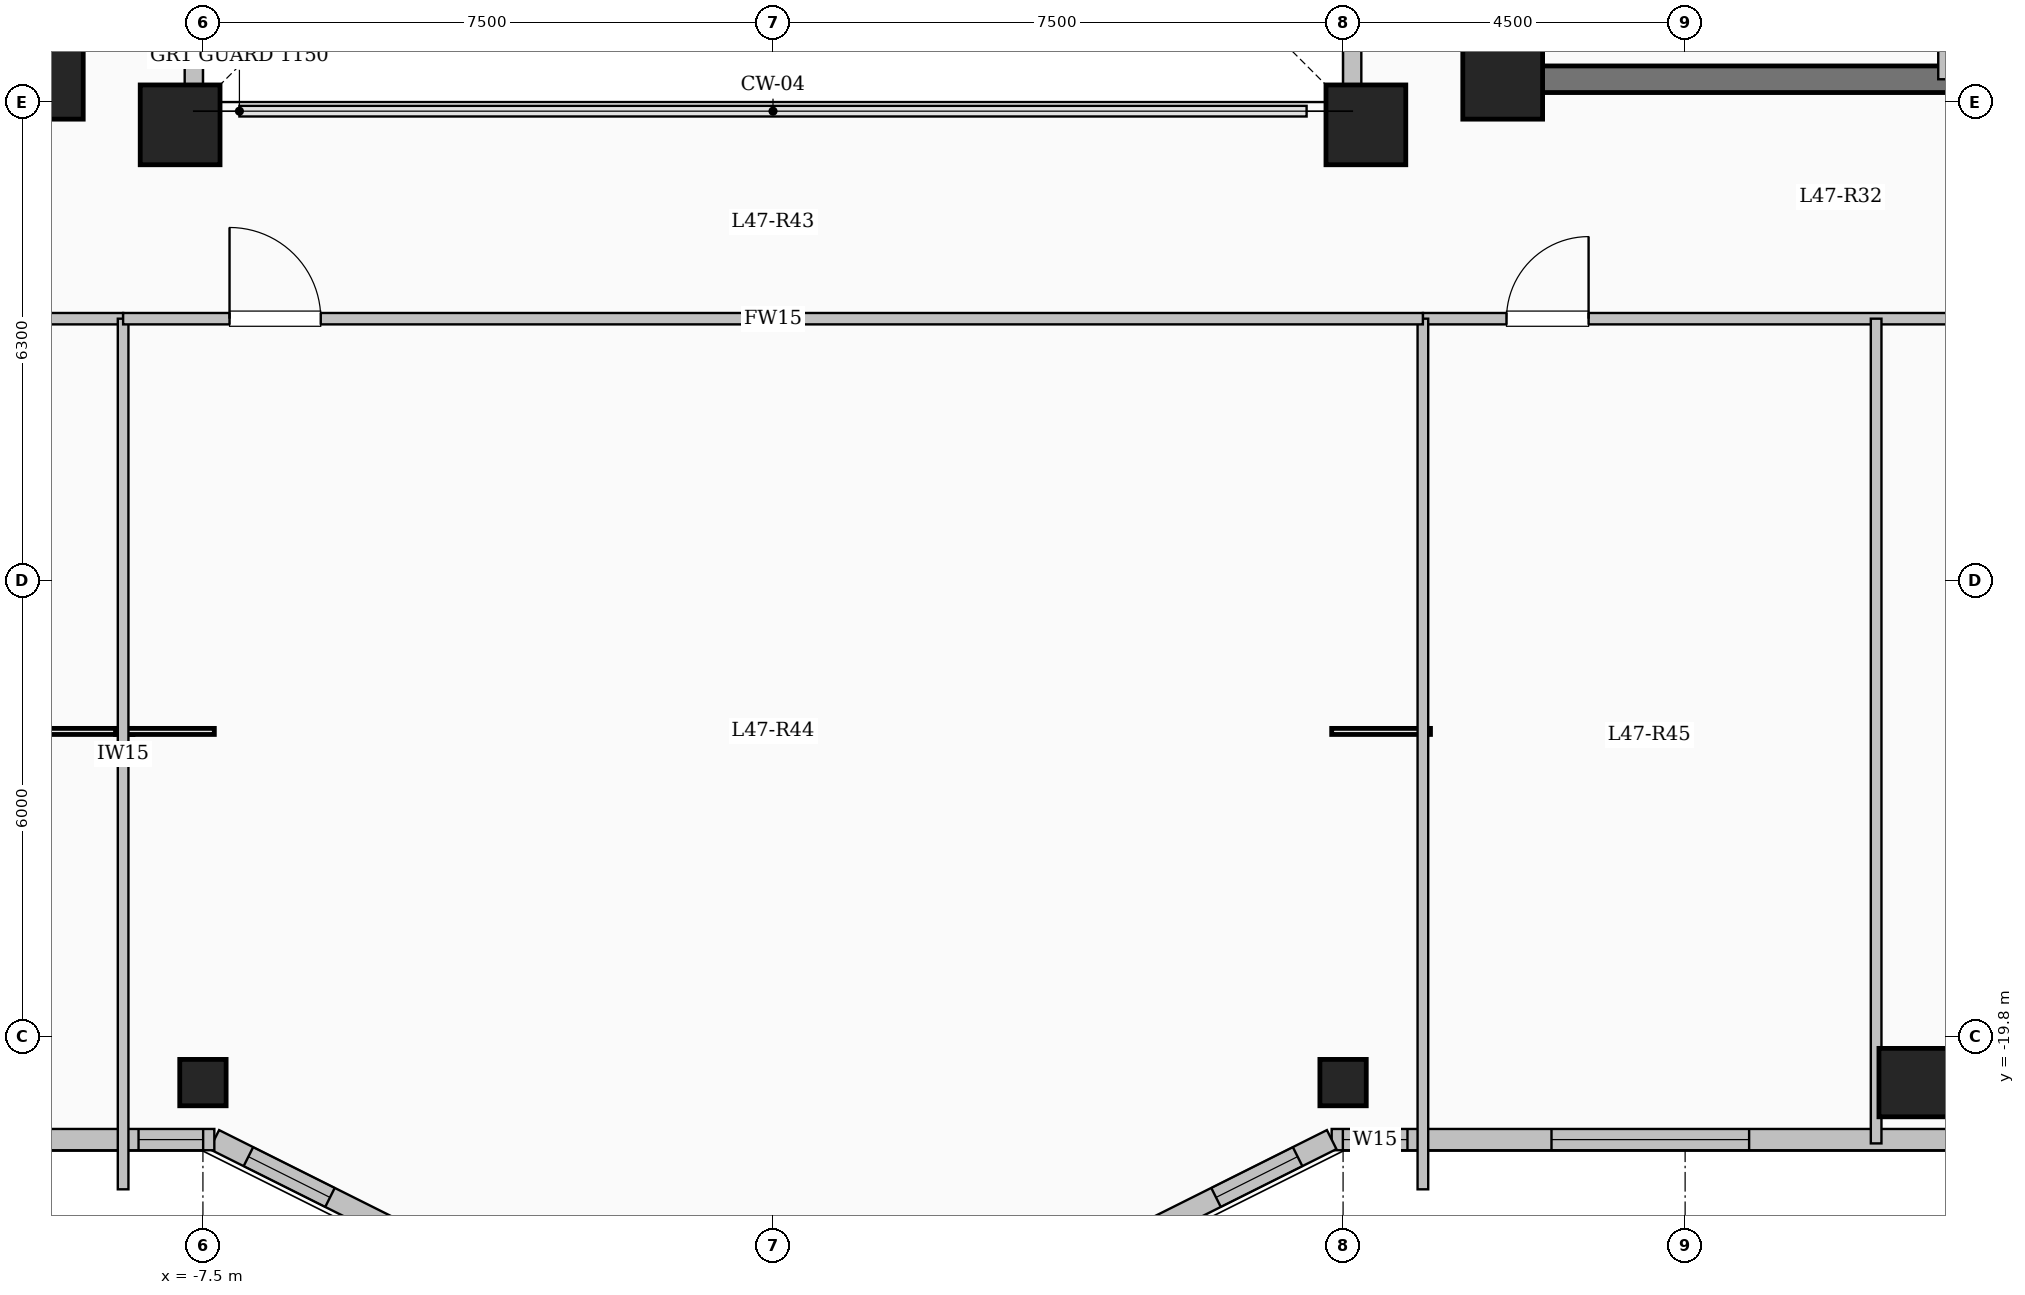
"""IFC4 building model, lengths in metres.
Left out: names, types, materials, properties, quantities, classifications, styles, units other than length and angle.
Written with IfcOpenShell. Run it as: python <this file> out.ifc"""

import sys

from ifc_helpers import new_model, si_unit, direction, frame, frame_2d, origin, origin_2d, place, context, subcontext, project, spatial, rectangle, hollow_circle, extrude, element, fill, save


model = new_model("IFC4")
c1 = context("Model", 3, precision=1e-05, world=origin(), true_north=direction((0.0, 1.0)))
c2 = subcontext(c1, "Body", "Model", "MODEL_VIEW")
j1 = project(units=[si_unit("LENGTHUNIT", "METRE"), si_unit("PLANEANGLEUNIT", "RADIAN")], contexts=[c1])
p1 = place(None, origin())
s1 = spatial("IfcSite", under=j1, at=p1, CompositionType="ELEMENT")
p2 = place(p1, origin())
s2 = spatial("IfcBuilding", under=s1, at=p2, CompositionType="ELEMENT")
p3 = place(p2, frame((0.0, 0.0, 172.8)))
s3 = spatial("IfcBuildingStorey", under=s2, at=p3, CompositionType="ELEMENT", Elevation=172.8)
for number, where, z_axis, x_axis in (
    (1, (-7.8, -7.8, 0.0), (0.0, 0.0, 1.0), (1.0, 0.0, 0.0)),
    (2, (7.8, -7.8, 0.0), (0.0, 0.0, 1.0), (1.0, 0.0, 0.0)),
    (3, (-9.6, -7.2, 0.0), (0.0, 0.0, 1.0), (1.0, 0.0, 0.0)),
    (4, (9.6, -7.2, 0.0), (0.0, 0.0, 1.0), (1.0, 0.0, 0.0)),
):
    element("IfcColumn", number, at=place(p3, frame(where, z_axis=z_axis, x_axis=x_axis)), inside=s3, PredefinedType="COLUMN", context=c2, shape_type="SweptSolid", body=[
        extrude(rectangle(XDim=1.05, YDim=1.05, at=origin_2d()), origin(), (0.0, 0.0, 1.0), 4.5),
    ])
for number, where, z_axis, x_axis in (
    (5, (-7.5, -20.4, 0.0), (0.0, 0.0, 1.0), (1.0, 0.0, 0.0)),
    (6, (7.5, -20.4, 0.0), (0.0, 0.0, 1.0), (1.0, 0.0, 0.0)),
):
    element("IfcColumn", number, at=place(p3, frame(where, z_axis=z_axis, x_axis=x_axis)), inside=s3, PredefinedType="COLUMN", context=c2, shape_type="SweptSolid", body=[
        extrude(hollow_circle(Radius=0.305, WallThickness=0.025, at=origin_2d()), origin(), (0.0, 0.0, 1.0), 4.5),
    ])
p4 = place(p3, frame((15.0, -20.4, 0.0), z_axis=(0.0, 0.0, 1.0), x_axis=(1.0, 0.0, 0.0)))
e7 = element("IfcColumn", 7, at=p4, inside=s3, PredefinedType="COLUMN", context=c2, shape_type="SweptSolid", body=[
    extrude(rectangle(XDim=0.9, YDim=0.9, at=origin_2d()), origin(), (0.0, 0.0, 1.0), 4.5),
])
p5 = place(p3, frame((7.62, -7.62, 0.0), z_axis=(0.0, 0.0, 1.0), x_axis=(0.0, 1.0, 0.0)))
e8 = element("IfcWall", 8, at=p5, inside=s3, PredefinedType="SOLIDWALL", context=c2, shape_type="SweptSolid", body=[
    extrude(rectangle(XDim=15.24, YDim=0.24, at=frame_2d((7.62, 0.0))), origin(), (0.0, 0.0, 1.0), 4.2),
])
p6 = place(p5, frame((6.92, 0.0, 0.95)))
e9 = element("IfcOpeningElement", 9, at=p6, cuts=e8, PredefinedType="OPENING", context=c2, shape_type="SweptSolid", body=[
    extrude(rectangle(XDim=1.4, YDim=1.5, at=frame_2d((0.7, 0.75))), frame((0.0, 0.13, 0.0), z_axis=(0.0, -1.0, 0.0), x_axis=(1.0, 0.0, 0.0)), (0.0, 0.0, 1.0), 0.26),
])
p7 = place(p3, frame((-7.62, 7.62, 0.0), z_axis=(0.0, 0.0, 1.0), x_axis=(0.0, -1.0, 0.0)))
e10 = element("IfcWall", 10, at=p7, inside=s3, PredefinedType="SOLIDWALL", context=c2, shape_type="SweptSolid", body=[
    extrude(rectangle(XDim=15.24, YDim=0.24, at=frame_2d((7.62, 0.0))), origin(), (0.0, 0.0, 1.0), 4.2),
])
p8 = place(p7, frame((6.92, 0.0, 0.95)))
e11 = element("IfcOpeningElement", 11, at=p8, cuts=e10, PredefinedType="OPENING", context=c2, shape_type="SweptSolid", body=[
    extrude(rectangle(XDim=1.4, YDim=1.5, at=frame_2d((0.7, 0.75))), frame((0.0, 0.13, 0.0), z_axis=(0.0, -1.0, 0.0), x_axis=(1.0, 0.0, 0.0)), (0.0, 0.0, 1.0), 0.26),
])
p9 = place(p3, frame((19.65, -21.15, 0.0), z_axis=(0.0, 0.0, 1.0), x_axis=(-1.0, 0.0, 0.0)))
e12 = element("IfcWall", 12, at=p9, inside=s3, PredefinedType="SOLIDWALL", context=c2, shape_type="SweptSolid", body=[
    extrude(rectangle(XDim=12.3, YDim=0.28, at=frame_2d((6.15, 0.0))), origin(), (0.0, 0.0, 1.0), 4.2),
])
p10 = place(p9, frame((1.26, 0.0, 0.85)))
e13 = element("IfcOpeningElement", 13, at=p10, cuts=e12, PredefinedType="OPENING", context=c2, shape_type="SweptSolid", body=[
    extrude(rectangle(XDim=2.6, YDim=2.4, at=frame_2d((1.3, 1.2))), frame((0.0, 0.15, 0.0), z_axis=(0.0, -1.0, 0.0), x_axis=(1.0, 0.0, 0.0)), (0.0, 0.0, 1.0), 0.3),
])
p11 = place(p9, frame((6.808, 0.0, 0.85)))
e14 = element("IfcOpeningElement", 14, at=p11, cuts=e12, PredefinedType="OPENING", context=c2, shape_type="SweptSolid", body=[
    extrude(rectangle(XDim=2.6, YDim=2.4, at=frame_2d((1.3, 1.2))), frame((0.0, 0.15, 0.0), z_axis=(0.0, -1.0, 0.0), x_axis=(1.0, 0.0, 0.0)), (0.0, 0.0, 1.0), 0.3),
])
p12 = place(p9, frame((11.303, 0.0, 0.95)))
e15 = element("IfcOpeningElement", 15, at=p12, cuts=e12, PredefinedType="OPENING", context=c2, shape_type="SweptSolid", body=[
    extrude(rectangle(XDim=0.85, YDim=1.5, at=frame_2d((0.425, 0.75))), frame((0.0, 0.15, 0.0), z_axis=(0.0, -1.0, 0.0), x_axis=(1.0, 0.0, 0.0)), (0.0, 0.0, 1.0), 0.3),
])
p13 = place(p3, frame((7.35, -21.15, 0.0), z_axis=(0.0, 0.0, 1.0), x_axis=(-0.894427191, -0.4472135955, 0.0)))
e16 = element("IfcWall", 16, at=p13, inside=s3, PredefinedType="SOLIDWALL", context=c2, shape_type="SweptSolid", body=[
    extrude(rectangle(XDim=3.354, YDim=0.28, at=frame_2d((1.677, 0.0))), origin(), (0.0, 0.0, 1.0), 4.2),
])
p14 = place(p13, frame((0.501, 0.0, 0.95)))
e17 = element("IfcOpeningElement", 17, at=p14, cuts=e16, PredefinedType="OPENING", context=c2, shape_type="SweptSolid", body=[
    extrude(rectangle(XDim=1.2, YDim=1.5, at=frame_2d((0.6, 0.75))), frame((0.0, 0.15, 0.0), z_axis=(0.0, -1.0, 0.0), x_axis=(1.0, 0.0, 0.0)), (0.0, 0.0, 1.0), 0.3),
])
p15 = place(p3, frame((-4.35, -22.65, 0.0), z_axis=(0.0, 0.0, 1.0), x_axis=(-0.894427191, 0.4472135955, 0.0)))
e18 = element("IfcWall", 18, at=p15, inside=s3, PredefinedType="SOLIDWALL", context=c2, shape_type="SweptSolid", body=[
    extrude(rectangle(XDim=3.354, YDim=0.28, at=frame_2d((1.677, 0.0))), origin(), (0.0, 0.0, 1.0), 4.2),
])
p16 = place(p15, frame((1.653, 0.0, 0.95)))
e19 = element("IfcOpeningElement", 19, at=p16, cuts=e18, PredefinedType="OPENING", context=c2, shape_type="SweptSolid", body=[
    extrude(rectangle(XDim=1.2, YDim=1.5, at=frame_2d((0.6, 0.75))), frame((0.0, 0.15, 0.0), z_axis=(0.0, -1.0, 0.0), x_axis=(1.0, 0.0, 0.0)), (0.0, 0.0, 1.0), 0.3),
])
p17 = place(p3, frame((-7.35, -21.15, 0.0), z_axis=(0.0, 0.0, 1.0), x_axis=(-1.0, 0.0, 0.0)))
e20 = element("IfcWall", 20, at=p17, inside=s3, PredefinedType="SOLIDWALL", context=c2, shape_type="SweptSolid", body=[
    extrude(rectangle(XDim=12.3, YDim=0.28, at=frame_2d((6.15, 0.0))), origin(), (0.0, 0.0, 1.0), 4.2),
])
p18 = place(p17, frame((0.147, 0.0, 0.95)))
e21 = element("IfcOpeningElement", 21, at=p18, cuts=e20, PredefinedType="OPENING", context=c2, shape_type="SweptSolid", body=[
    extrude(rectangle(XDim=0.85, YDim=1.5, at=frame_2d((0.425, 0.75))), frame((0.0, 0.15, 0.0), z_axis=(0.0, -1.0, 0.0), x_axis=(1.0, 0.0, 0.0)), (0.0, 0.0, 1.0), 0.3),
])
p19 = place(p17, frame((2.992, 0.0, 0.85)))
e22 = element("IfcOpeningElement", 22, at=p19, cuts=e20, PredefinedType="OPENING", context=c2, shape_type="SweptSolid", body=[
    extrude(rectangle(XDim=2.6, YDim=2.4, at=frame_2d((1.3, 1.2))), frame((0.0, 0.15, 0.0), z_axis=(0.0, -1.0, 0.0), x_axis=(1.0, 0.0, 0.0)), (0.0, 0.0, 1.0), 0.3),
])
p20 = place(p17, frame((8.54, 0.0, 0.85)))
e23 = element("IfcOpeningElement", 23, at=p20, cuts=e20, PredefinedType="OPENING", context=c2, shape_type="SweptSolid", body=[
    extrude(rectangle(XDim=2.6, YDim=2.4, at=frame_2d((1.3, 1.2))), frame((0.0, 0.15, 0.0), z_axis=(0.0, -1.0, 0.0), x_axis=(1.0, 0.0, 0.0)), (0.0, 0.0, 1.0), 0.3),
])
p21 = place(p3, frame((10.075, -7.2, 0.0), z_axis=(0.0, 0.0, 1.0), x_axis=(1.0, 0.0, 0.0)))
e24 = element("IfcWall", 24, at=p21, inside=s3, PredefinedType="SHEAR", context=c2, shape_type="SweptSolid", body=[
    extrude(rectangle(XDim=8.55, YDim=0.35, at=frame_2d((4.275, 0.0))), origin(), (0.0, 0.0, 1.0), 4.5),
])
p22 = place(p3, frame((15.4, -7.2, 0.0), z_axis=(0.0, 0.0, 1.0), x_axis=(0.0, 1.0, 0.0)))
e25 = element("IfcWall", 25, at=p22, inside=s3, PredefinedType="PARTITIONING", context=c2, shape_type="SweptSolid", body=[
    extrude(rectangle(XDim=10.45, YDim=0.14, at=frame_2d((5.225, 0.0))), origin(), (0.0, 0.0, 1.0), 4.2),
])
p23 = place(p22, frame((9.25, 0.0, 0.0)))
e26 = element("IfcOpeningElement", 26, at=p23, cuts=e25, PredefinedType="OPENING", context=c2, shape_type="SweptSolid", body=[
    extrude(rectangle(XDim=0.9, YDim=2.08, at=frame_2d((0.45, 1.04))), frame((0.0, 0.08, 0.0), z_axis=(0.0, -1.0, 0.0), x_axis=(1.0, 0.0, 0.0)), (0.0, 0.0, 1.0), 0.16),
])
p24 = place(p3, frame((-19.55, -10.35, 0.0), z_axis=(0.0, 0.0, 1.0), x_axis=(1.0, 0.0, 0.0)))
e27 = element("IfcWall", 27, at=p24, inside=s3, PredefinedType="PARTITIONING", context=c2, shape_type="SweptSolid", body=[
    extrude(rectangle(XDim=11.0, YDim=0.15, at=frame_2d((5.5, 0.0))), origin(), (0.0, 0.0, 1.0), 4.2),
])
p25 = place(p24, frame((1.1, 0.0, 0.0)))
e28 = element("IfcOpeningElement", 28, at=p25, cuts=e27, PredefinedType="OPENING", context=c2, shape_type="SweptSolid", body=[
    extrude(rectangle(XDim=1.08, YDim=2.15, at=frame_2d((0.54, 1.075))), frame((0.0, 0.085, 0.0), z_axis=(0.0, -1.0, 0.0), x_axis=(1.0, 0.0, 0.0)), (0.0, 0.0, 1.0), 0.17),
])
p26 = place(p24, frame((5.718, 0.0, 0.0)))
e29 = element("IfcOpeningElement", 29, at=p26, cuts=e27, PredefinedType="OPENING", context=c2, shape_type="SweptSolid", body=[
    extrude(rectangle(XDim=1.08, YDim=2.15, at=frame_2d((0.54, 1.075))), frame((0.0, 0.085, 0.0), z_axis=(0.0, -1.0, 0.0), x_axis=(1.0, 0.0, 0.0)), (0.0, 0.0, 1.0), 0.17),
])
p27 = place(p3, frame((8.55, -10.35, 0.0), z_axis=(0.0, 0.0, 1.0), x_axis=(1.0, 0.0, 0.0)))
e30 = element("IfcWall", 30, at=p27, inside=s3, PredefinedType="PARTITIONING", context=c2, shape_type="SweptSolid", body=[
    extrude(rectangle(XDim=11.0, YDim=0.15, at=frame_2d((5.5, 0.0))), origin(), (0.0, 0.0, 1.0), 4.2),
])
p28 = place(p27, frame((1.1, 0.0, 0.0)))
e31 = element("IfcOpeningElement", 31, at=p28, cuts=e30, PredefinedType="OPENING", context=c2, shape_type="SweptSolid", body=[
    extrude(rectangle(XDim=1.08, YDim=2.15, at=frame_2d((0.54, 1.075))), frame((0.0, 0.085, 0.0), z_axis=(0.0, -1.0, 0.0), x_axis=(1.0, 0.0, 0.0)), (0.0, 0.0, 1.0), 0.17),
])
p29 = place(p27, frame((6.963, 0.0, 0.0)))
e32 = element("IfcOpeningElement", 32, at=p29, cuts=e30, PredefinedType="OPENING", context=c2, shape_type="SweptSolid", body=[
    extrude(rectangle(XDim=1.2, YDim=2.15, at=frame_2d((0.6, 1.075))), frame((0.0, 0.085, 0.0), z_axis=(0.0, -1.0, 0.0), x_axis=(1.0, 0.0, 0.0)), (0.0, 0.0, 1.0), 0.17),
])
for number, where, z_axis, x_axis in (
    (33, (-8.55, -21.804, 0.0), (0.0, 0.0, 1.0), (0.0, 1.0, 0.0)),
    (34, (8.55, -21.804, 0.0), (0.0, 0.0, 1.0), (0.0, 1.0, 0.0)),
):
    element("IfcWall", number, at=place(p3, frame(where, z_axis=z_axis, x_axis=x_axis)), inside=s3, PredefinedType="PARTITIONING", context=c2, shape_type="SweptSolid", body=[
        extrude(rectangle(XDim=11.454, YDim=0.14, at=frame_2d((5.727, 0.0))), origin(), (0.0, 0.0, 1.0), 4.2),
    ])
p30 = place(p3, frame((14.513, -21.2, 0.0), z_axis=(0.0, 0.0, 1.0), x_axis=(0.0, 1.0, 0.0)))
e35 = element("IfcWall", 35, at=p30, inside=s3, PredefinedType="PARTITIONING", context=c2, shape_type="SweptSolid", body=[
    extrude(rectangle(XDim=10.85, YDim=0.14, at=frame_2d((5.425, 0.0))), origin(), (0.0, 0.0, 1.0), 4.2),
])
p31 = place(p3, frame((-8.55, -10.35, 0.0), z_axis=(0.0, 0.0, 1.0), x_axis=(1.0, 0.0, 0.0)))
e36 = element("IfcWall", 36, at=p31, inside=s3, PredefinedType="PARTITIONING", context=c2, shape_type="SweptSolid", body=[
    extrude(rectangle(XDim=17.1, YDim=0.15, at=frame_2d((8.55, 0.0))), origin(), (0.0, 0.0, 1.0), 4.2),
])
p32 = place(p31, frame((1.4, 0.0, 0.0)))
e37 = element("IfcOpeningElement", 37, at=p32, cuts=e36, PredefinedType="OPENING", context=c2, shape_type="SweptSolid", body=[
    extrude(rectangle(XDim=1.2, YDim=2.15, at=frame_2d((0.6, 1.075))), frame((0.0, 0.085, 0.0), z_axis=(0.0, -1.0, 0.0), x_axis=(1.0, 0.0, 0.0)), (0.0, 0.0, 1.0), 0.17),
])
p33 = place(p11, origin())
e38 = element("IfcWindow", 38, at=p33, inside=s3, PartitioningType="SINGLE_PANEL", PredefinedType="WINDOW", context=c2, shape_type="SweptSolid", body=[
    extrude(rectangle(XDim=2.6, YDim=2.4, at=frame_2d((1.3, 1.2))), frame((0.0, 0.03, 0.0), z_axis=(0.0, -1.0, 0.0), x_axis=(1.0, 0.0, 0.0)), (0.0, 0.0, 1.0), 0.06),
])
fill(e14, e38)
p34 = place(p12, origin())
e39 = element("IfcWindow", 39, at=p34, inside=s3, PartitioningType="SINGLE_PANEL", PredefinedType="WINDOW", context=c2, shape_type="SweptSolid", body=[
    extrude(rectangle(XDim=0.85, YDim=1.5, at=frame_2d((0.425, 0.75))), frame((0.0, 0.03, 0.0), z_axis=(0.0, -1.0, 0.0), x_axis=(1.0, 0.0, 0.0)), (0.0, 0.0, 1.0), 0.06),
])
fill(e15, e39)
p35 = place(p14, origin())
e40 = element("IfcWindow", 40, at=p35, inside=s3, PartitioningType="SINGLE_PANEL", PredefinedType="WINDOW", context=c2, shape_type="SweptSolid", body=[
    extrude(rectangle(XDim=1.2, YDim=1.5, at=frame_2d((0.6, 0.75))), frame((0.0, 0.03, 0.0), z_axis=(0.0, -1.0, 0.0), x_axis=(1.0, 0.0, 0.0)), (0.0, 0.0, 1.0), 0.06),
])
fill(e17, e40)
p36 = place(p16, origin())
e41 = element("IfcWindow", 41, at=p36, inside=s3, PartitioningType="SINGLE_PANEL", PredefinedType="WINDOW", context=c2, shape_type="SweptSolid", body=[
    extrude(rectangle(XDim=1.2, YDim=1.5, at=frame_2d((0.6, 0.75))), frame((0.0, 0.03, 0.0), z_axis=(0.0, -1.0, 0.0), x_axis=(1.0, 0.0, 0.0)), (0.0, 0.0, 1.0), 0.06),
])
fill(e19, e41)
p37 = place(p18, origin())
e42 = element("IfcWindow", 42, at=p37, inside=s3, PartitioningType="SINGLE_PANEL", PredefinedType="WINDOW", context=c2, shape_type="SweptSolid", body=[
    extrude(rectangle(XDim=0.85, YDim=1.5, at=frame_2d((0.425, 0.75))), frame((0.0, 0.03, 0.0), z_axis=(0.0, -1.0, 0.0), x_axis=(1.0, 0.0, 0.0)), (0.0, 0.0, 1.0), 0.06),
])
fill(e21, e42)
p38 = place(p32, origin())
e43 = element("IfcDoor", 43, at=p38, inside=s3, OperationType="SINGLE_SWING_LEFT", PredefinedType="DOOR", context=c2, shape_type="SweptSolid", body=[
    extrude(rectangle(XDim=1.2, YDim=2.15, at=frame_2d((0.6, 1.075))), frame((0.0, 0.025, 0.0), z_axis=(0.0, -1.0, 0.0), x_axis=(1.0, 0.0, 0.0)), (0.0, 0.0, 1.0), 0.05),
])
fill(e37, e43)
p39 = place(p28, origin())
e44 = element("IfcDoor", 44, at=p39, inside=s3, OperationType="SINGLE_SWING_RIGHT", PredefinedType="DOOR", context=c2, shape_type="SweptSolid", body=[
    extrude(rectangle(XDim=1.08, YDim=2.15, at=frame_2d((0.54, 1.075))), frame((0.0, 0.025, 0.0), z_axis=(0.0, -1.0, 0.0), x_axis=(1.0, 0.0, 0.0)), (0.0, 0.0, 1.0), 0.05),
])
fill(e31, e44)
save(model, sys.argv[1])
